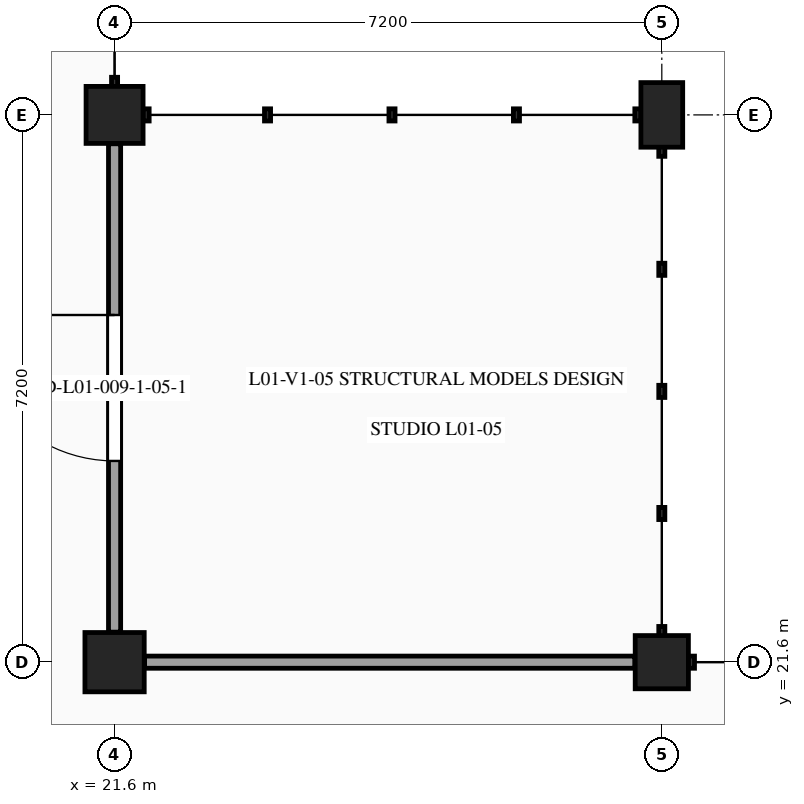
"""IFC4 building model, lengths in metres.
Left out: names, types, materials, properties, quantities, classifications, styles, units other than length and angle.
Written with IfcOpenShell. Run it as: python <this file> out.ifc"""

import sys

from ifc_helpers import new_model, si_unit, direction, frame, frame_2d, origin, origin_2d, place, context, subcontext, project, spatial, rectangle, extrude, element, fill, save


model = new_model("IFC4")
c1 = context("Model", 3, precision=1e-05, world=origin(), true_north=direction((0.0, 1.0)))
c2 = subcontext(c1, "Body", "Model", "MODEL_VIEW")
j1 = project(units=[si_unit("LENGTHUNIT", "METRE"), si_unit("PLANEANGLEUNIT", "RADIAN")], contexts=[c1])
p1 = place(None, origin())
s1 = spatial("IfcSite", under=j1, at=p1, CompositionType="ELEMENT")
p2 = place(p1, origin())
s2 = spatial("IfcBuilding", under=s1, at=p2, CompositionType="ELEMENT")
p3 = place(p2, frame((0.0, 0.0, 5.4)))
s3 = spatial("IfcBuildingStorey", under=s2, at=p3, CompositionType="ELEMENT", Elevation=5.4)
p4 = place(p3, frame((21.6, 21.6, 0.0), z_axis=(0.0, 0.0, 1.0), x_axis=(1.0, 0.0, 0.0)))
e1 = element("IfcColumn", 1, at=p4, inside=s3, PredefinedType="COLUMN", context=c2, shape_type="SweptSolid", body=[
    extrude(rectangle(XDim=0.78, YDim=0.78, at=origin_2d()), origin(), (0.0, 0.0, 1.0), 4.5),
])
p5 = place(p3, frame((21.6, 28.8, 0.0), z_axis=(0.0, 0.0, 1.0), x_axis=(1.0, 0.0, 0.0)))
e2 = element("IfcColumn", 2, at=p5, inside=s3, PredefinedType="COLUMN", context=c2, shape_type="SweptSolid", body=[
    extrude(rectangle(XDim=0.75, YDim=0.75, at=origin_2d()), origin(), (0.0, 0.0, 1.0), 4.5),
])
p6 = place(p3, frame((28.8, 21.6, 0.0), z_axis=(0.0, 0.0, 1.0), x_axis=(1.0, 0.0, 0.0)))
e3 = element("IfcColumn", 3, at=p6, inside=s3, PredefinedType="COLUMN", context=c2, shape_type="SweptSolid", body=[
    extrude(rectangle(XDim=0.7, YDim=0.7, at=origin_2d()), origin(), (0.0, 0.0, 1.0), 4.5),
])
p7 = place(p3, frame((28.8, 28.8, 0.0), z_axis=(0.0, 0.0, 1.0), x_axis=(1.0, 0.0, 0.0)))
e4 = element("IfcColumn", 4, at=p7, inside=s3, PredefinedType="COLUMN", context=c2, shape_type="SweptSolid", body=[
    extrude(rectangle(XDim=0.55, YDim=0.85, at=origin_2d()), origin(), (0.0, 0.0, 1.0), 4.5),
])
p8 = place(p3, frame((21.6, 21.995, 0.0), z_axis=(0.0, 0.0, 1.0), x_axis=(0.0, 1.0, 0.0)))
e5 = element("IfcWall", 5, at=p8, inside=s3, PredefinedType="PARTITIONING", context=c2, shape_type="SweptSolid", body=[
    extrude(rectangle(XDim=6.425, YDim=0.16, at=frame_2d((3.212, 0.0))), origin(), (0.0, 0.0, 1.0), 3.515),
])
p9 = place(p8, frame((2.252, 0.0, 0.0)))
e6 = element("IfcOpeningElement", 6, at=p9, cuts=e5, PredefinedType="OPENING", context=c2, shape_type="SweptSolid", body=[
    extrude(rectangle(XDim=1.92, YDim=2.35, at=frame_2d((0.96, 1.175))), frame((0.0, 0.09, 0.0), z_axis=(0.0, -1.0, 0.0), x_axis=(1.0, 0.0, 0.0)), (0.0, 0.0, 1.0), 0.18),
])
p10 = place(p3, frame((21.995, 21.6, 0.0), z_axis=(0.0, 0.0, 1.0), x_axis=(1.0, 0.0, 0.0)))
e7 = element("IfcWall", 7, at=p10, inside=s3, PredefinedType="PARTITIONING", context=c2, shape_type="SweptSolid", body=[
    extrude(rectangle(XDim=6.45, YDim=0.16, at=frame_2d((3.225, 0.0))), origin(), (0.0, 0.0, 1.0), 3.49),
])
p11 = place(p9, origin())
e8 = element("IfcDoor", 8, at=p11, inside=s3, OperationType="SINGLE_SWING_RIGHT", PredefinedType="DOOR", context=c2, shape_type="SweptSolid", body=[
    extrude(rectangle(XDim=1.92, YDim=2.35, at=frame_2d((0.96, 1.175))), frame((0.0, 0.025, 0.0), z_axis=(0.0, -1.0, 0.0), x_axis=(1.0, 0.0, 0.0)), (0.0, 0.0, 1.0), 0.05),
])
fill(e6, e8)
save(model, sys.argv[1])
